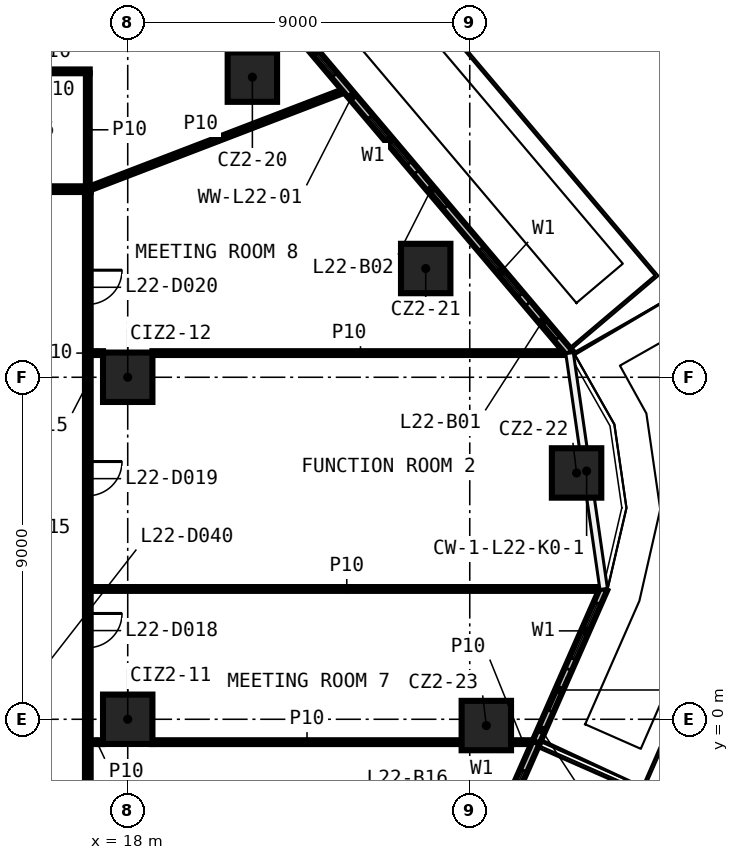
"""IFC4 building model, lengths in metres.
Left out: names, types, materials, properties, quantities, classifications, styles, units other than length and angle.
Written with IfcOpenShell. Run it as: python <this file> out.ifc"""

import sys

from ifc_helpers import new_model, si_unit, direction, frame, frame_2d, origin, origin_2d, place, context, subcontext, project, spatial, rectangle, extrude, element, fill, save


model = new_model("IFC4")
c1 = context("Model", 3, precision=1e-05, world=origin(), true_north=direction((0.0, 1.0)))
c2 = subcontext(c1, "Body", "Model", "MODEL_VIEW")
j1 = project(units=[si_unit("LENGTHUNIT", "METRE"), si_unit("PLANEANGLEUNIT", "RADIAN")], contexts=[c1])
p1 = place(None, origin())
s1 = spatial("IfcSite", under=j1, at=p1, CompositionType="ELEMENT")
p2 = place(p1, origin())
s2 = spatial("IfcBuilding", under=s1, at=p2, CompositionType="ELEMENT")
p3 = place(p2, frame((0.0, 0.0, 106.3)))
s3 = spatial("IfcBuildingStorey", under=s2, at=p3, CompositionType="ELEMENT", Elevation=106.3)
for number, where, z_axis, x_axis in (
    (1, (21.28, 16.898, 0.0), (0.0, 0.0, 1.0), (1.0, 0.0, 0.0)),
    (2, (25.841, 11.862, 0.0), (0.0, 0.0, 1.0), (1.0, 0.0, 0.0)),
    (3, (29.811, 6.482, 0.0), (0.0, 0.0, 1.0), (1.0, 0.0, 0.0)),
    (4, (27.436, -0.165, 0.0), (0.0, 0.0, 1.0), (1.0, 0.0, 0.0)),
    (5, (18.0, 0.0, 0.0), (0.0, 0.0, 1.0), (1.0, 0.0, 0.0)),
    (6, (18.0, 9.0, 0.0), (0.0, 0.0, 1.0), (1.0, 0.0, 0.0)),
):
    element("IfcColumn", number, at=place(p3, frame(where, z_axis=z_axis, x_axis=x_axis)), inside=s3, PredefinedType="COLUMN", context=c2, shape_type="SweptSolid", body=[
        extrude(rectangle(XDim=1.3, YDim=1.3, at=origin_2d()), origin(), (0.0, 0.0, 1.0), 3.3),
    ])
p4 = place(p3, frame((17.025, -0.602, 0.0), z_axis=(0.0, 0.0, 1.0), x_axis=(1.0, 0.0, 0.0)))
e7 = element("IfcWall", 7, at=p4, inside=s3, PredefinedType="PARTITIONING", context=c2, shape_type="SweptSolid", body=[
    extrude(rectangle(XDim=0.325, YDim=0.1, at=frame_2d((0.163, 0.0))), origin(), (0.0, 0.0, 1.0), 3.3),
])
p5 = place(p3, frame((18.65, -0.602, 0.0), z_axis=(0.0, 0.0, 1.0), x_axis=(1.0, 0.0, 0.0)))
e8 = element("IfcWall", 8, at=p5, inside=s3, PredefinedType="PARTITIONING", context=c2, shape_type="SweptSolid", body=[
    extrude(rectangle(XDim=8.136, YDim=0.1, at=frame_2d((4.068, 0.0))), origin(), (0.0, 0.0, 1.0), 3.3),
])
p6 = place(p3, frame((28.086, -0.602, 0.0), z_axis=(0.0, 0.0, 1.0), x_axis=(1.0, 0.0, 0.0)))
e9 = element("IfcWall", 9, at=p6, inside=s3, PredefinedType="PARTITIONING", context=c2, shape_type="SweptSolid", body=[
    extrude(rectangle(XDim=0.64, YDim=0.1, at=frame_2d((0.32, 0.0))), origin(), (0.0, 0.0, 1.0), 3.3),
])
p7 = place(p3, frame((17.025, 3.429, 0.0), z_axis=(0.0, 0.0, 1.0), x_axis=(1.0, 0.0, 0.0)))
e10 = element("IfcWall", 10, at=p7, inside=s3, PredefinedType="PARTITIONING", context=c2, shape_type="SweptSolid", body=[
    extrude(rectangle(XDim=13.477, YDim=0.1, at=frame_2d((6.739, 0.0))), origin(), (0.0, 0.0, 1.0), 3.3),
])
p8 = place(p3, frame((17.025, 9.636, 0.0), z_axis=(0.0, 0.0, 1.0), x_axis=(1.0, 0.0, 0.0)))
e11 = element("IfcWall", 11, at=p8, inside=s3, PredefinedType="PARTITIONING", context=c2, shape_type="SweptSolid", body=[
    extrude(rectangle(XDim=0.325, YDim=0.1, at=frame_2d((0.163, 0.0))), origin(), (0.0, 0.0, 1.0), 3.3),
])
p9 = place(p3, frame((18.65, 9.636, 0.0), z_axis=(0.0, 0.0, 1.0), x_axis=(1.0, 0.0, 0.0)))
e12 = element("IfcWall", 12, at=p9, inside=s3, PredefinedType="PARTITIONING", context=c2, shape_type="SweptSolid", body=[
    extrude(rectangle(XDim=10.95, YDim=0.1, at=frame_2d((5.475, 0.0))), origin(), (0.0, 0.0, 1.0), 3.3),
])
p10 = place(p3, frame((-17.025, 13.95, 0.0), z_axis=(0.0, 0.0, 1.0), x_axis=(1.0, 0.0, 0.0)))
e13 = element("IfcWall", 13, at=p10, inside=s3, PredefinedType="PARTITIONING", context=c2, shape_type="SweptSolid", body=[
    extrude(rectangle(XDim=34.05, YDim=0.15, at=frame_2d((17.025, 0.0))), origin(), (0.0, 0.0, 1.0), 3.3),
])
p11 = place(p10, frame((29.735, 0.0, 0.0)))
e14 = element("IfcOpeningElement", 14, at=p11, cuts=e13, PredefinedType="OPENING", context=c2, shape_type="SweptSolid", body=[
    extrude(rectangle(XDim=1.0, YDim=2.1, at=frame_2d((0.5, 1.05))), frame((0.0, 0.085, 0.0), z_axis=(0.0, -1.0, 0.0), x_axis=(1.0, 0.0, 0.0)), (0.0, 0.0, 1.0), 0.17),
])
p12 = place(p10, frame((25.513, 0.0, 0.0)))
e15 = element("IfcOpeningElement", 15, at=p12, cuts=e13, PredefinedType="OPENING", context=c2, shape_type="SweptSolid", body=[
    extrude(rectangle(XDim=1.0, YDim=2.1, at=frame_2d((0.5, 1.05))), frame((0.0, 0.085, 0.0), z_axis=(0.0, -1.0, 0.0), x_axis=(1.0, 0.0, 0.0)), (0.0, 0.0, 1.0), 0.17),
])
p13 = place(p10, frame((18.631, 0.0, 0.0)))
e16 = element("IfcOpeningElement", 16, at=p13, cuts=e13, PredefinedType="OPENING", context=c2, shape_type="SweptSolid", body=[
    extrude(rectangle(XDim=1.0, YDim=2.1, at=frame_2d((0.5, 1.05))), frame((0.0, 0.085, 0.0), z_axis=(0.0, -1.0, 0.0), x_axis=(1.0, 0.0, 0.0)), (0.0, 0.0, 1.0), 0.17),
])
p14 = place(p10, frame((16.545, 0.0, 0.0)))
e17 = element("IfcOpeningElement", 17, at=p14, cuts=e13, PredefinedType="OPENING", context=c2, shape_type="SweptSolid", body=[
    extrude(rectangle(XDim=1.0, YDim=2.1, at=frame_2d((0.5, 1.05))), frame((0.0, 0.085, 0.0), z_axis=(0.0, -1.0, 0.0), x_axis=(1.0, 0.0, 0.0)), (0.0, 0.0, 1.0), 0.17),
])
p15 = place(p10, frame((9.659, 0.0, 0.0)))
e18 = element("IfcOpeningElement", 18, at=p15, cuts=e13, PredefinedType="OPENING", context=c2, shape_type="SweptSolid", body=[
    extrude(rectangle(XDim=1.0, YDim=2.1, at=frame_2d((0.5, 1.05))), frame((0.0, 0.085, 0.0), z_axis=(0.0, -1.0, 0.0), x_axis=(1.0, 0.0, 0.0)), (0.0, 0.0, 1.0), 0.17),
])
p16 = place(p10, frame((7.577, 0.0, 0.0)))
e19 = element("IfcOpeningElement", 19, at=p16, cuts=e13, PredefinedType="OPENING", context=c2, shape_type="SweptSolid", body=[
    extrude(rectangle(XDim=1.0, YDim=2.1, at=frame_2d((0.5, 1.05))), frame((0.0, 0.085, 0.0), z_axis=(0.0, -1.0, 0.0), x_axis=(1.0, 0.0, 0.0)), (0.0, 0.0, 1.0), 0.17),
])
p17 = place(p10, frame((2.381, 0.0, 0.0)))
e20 = element("IfcOpeningElement", 20, at=p17, cuts=e13, PredefinedType="OPENING", context=c2, shape_type="SweptSolid", body=[
    extrude(rectangle(XDim=0.9, YDim=2.1, at=frame_2d((0.45, 1.05))), frame((0.0, 0.085, 0.0), z_axis=(0.0, -1.0, 0.0), x_axis=(1.0, 0.0, 0.0)), (0.0, 0.0, 1.0), 0.17),
])
p18 = place(p3, frame((14.5, 17.05, 0.0), z_axis=(0.0, 0.0, 1.0), x_axis=(1.0, 0.0, 0.0)))
e21 = element("IfcWall", 21, at=p18, inside=s3, PredefinedType="PARTITIONING", context=c2, shape_type="SweptSolid", body=[
    extrude(rectangle(XDim=2.5, YDim=0.1, at=frame_2d((1.25, 0.0))), origin(), (0.0, 0.0, 1.0), 3.3),
])
p19 = place(p3, frame((16.95, 13.95, 0.0), z_axis=(0.0, 0.0, 1.0), x_axis=(0.933635037811, 0.358225649796, 0.0)))
e22 = element("IfcWall", 22, at=p19, inside=s3, PredefinedType="PARTITIONING", context=c2, shape_type="SweptSolid", body=[
    extrude(rectangle(XDim=7.275, YDim=0.1, at=frame_2d((3.638, 0.0))), origin(), (0.0, 0.0, 1.0), 3.3),
])
p20 = place(p3, frame((16.95, 13.875, 0.0), z_axis=(0.0, 0.0, 1.0), x_axis=(0.0, -1.0, 0.0)))
e23 = element("IfcWall", 23, at=p20, inside=s3, PredefinedType="PARTITIONING", context=c2, shape_type="SweptSolid", body=[
    extrude(rectangle(XDim=27.75, YDim=0.15, at=frame_2d((13.875, 0.0))), origin(), (0.0, 0.0, 1.0), 3.3),
])
p21 = place(p20, frame((24.917, 0.0, 0.0)))
e24 = element("IfcOpeningElement", 24, at=p21, cuts=e23, PredefinedType="OPENING", context=c2, shape_type="SweptSolid", body=[
    extrude(rectangle(XDim=0.9, YDim=2.1, at=frame_2d((0.45, 1.05))), frame((0.0, 0.085, 0.0), z_axis=(0.0, -1.0, 0.0), x_axis=(1.0, 0.0, 0.0)), (0.0, 0.0, 1.0), 0.17),
])
p22 = place(p20, frame((20.086, 0.0, 0.0)))
e25 = element("IfcOpeningElement", 25, at=p22, cuts=e23, PredefinedType="OPENING", context=c2, shape_type="SweptSolid", body=[
    extrude(rectangle(XDim=0.9, YDim=2.1, at=frame_2d((0.45, 1.05))), frame((0.0, 0.085, 0.0), z_axis=(0.0, -1.0, 0.0), x_axis=(1.0, 0.0, 0.0)), (0.0, 0.0, 1.0), 0.17),
])
p23 = place(p20, frame((16.047, 0.0, 0.0)))
e26 = element("IfcOpeningElement", 26, at=p23, cuts=e23, PredefinedType="OPENING", context=c2, shape_type="SweptSolid", body=[
    extrude(rectangle(XDim=0.9, YDim=2.1, at=frame_2d((0.45, 1.05))), frame((0.0, 0.085, 0.0), z_axis=(0.0, -1.0, 0.0), x_axis=(1.0, 0.0, 0.0)), (0.0, 0.0, 1.0), 0.17),
])
p24 = place(p20, frame((11.091, 0.0, 0.0)))
e27 = element("IfcOpeningElement", 27, at=p24, cuts=e23, PredefinedType="OPENING", context=c2, shape_type="SweptSolid", body=[
    extrude(rectangle(XDim=0.9, YDim=2.1, at=frame_2d((0.45, 1.05))), frame((0.0, 0.085, 0.0), z_axis=(0.0, -1.0, 0.0), x_axis=(1.0, 0.0, 0.0)), (0.0, 0.0, 1.0), 0.17),
])
p25 = place(p20, frame((7.093, 0.0, 0.0)))
e28 = element("IfcOpeningElement", 28, at=p25, cuts=e23, PredefinedType="OPENING", context=c2, shape_type="SweptSolid", body=[
    extrude(rectangle(XDim=0.9, YDim=2.1, at=frame_2d((0.45, 1.05))), frame((0.0, 0.085, 0.0), z_axis=(0.0, -1.0, 0.0), x_axis=(1.0, 0.0, 0.0)), (0.0, 0.0, 1.0), 0.17),
])
p26 = place(p20, frame((2.057, 0.0, 0.0)))
e29 = element("IfcOpeningElement", 29, at=p26, cuts=e23, PredefinedType="OPENING", context=c2, shape_type="SweptSolid", body=[
    extrude(rectangle(XDim=0.9, YDim=2.1, at=frame_2d((0.45, 1.05))), frame((0.0, 0.085, 0.0), z_axis=(0.0, -1.0, 0.0), x_axis=(1.0, 0.0, 0.0)), (0.0, 0.0, 1.0), 0.17),
])
p27 = place(p3, frame((16.95, 14.025, 0.0), z_axis=(0.0, 0.0, 1.0), x_axis=(0.0, 1.0, 0.0)))
e30 = element("IfcWall", 30, at=p27, inside=s3, PredefinedType="PARTITIONING", context=c2, shape_type="SweptSolid", body=[
    extrude(rectangle(XDim=2.975, YDim=0.1, at=frame_2d((1.488, 0.0))), origin(), (0.0, 0.0, 1.0), 3.3),
])
p28 = place(p3, frame((29.626, 9.636, 0.0), z_axis=(0.0, 0.0, 1.0), x_axis=(-0.6460547702, 0.763291054514, 0.0)))
e31 = element("IfcWall", 31, at=p28, inside=s3, PredefinedType="SOLIDWALL", context=c2, shape_type="SweptSolid", body=[
    extrude(rectangle(XDim=13.615, YDim=0.2, at=frame_2d((6.808, 0.0))), origin(), (0.0, 0.0, 1.0), 3.3),
])
p29 = place(p28, frame((2.0, 0.0, 0.6)))
e32 = element("IfcOpeningElement", 32, at=p29, cuts=e31, PredefinedType="OPENING", context=c2, shape_type="SweptSolid", body=[
    extrude(rectangle(XDim=1.6, YDim=2.4, at=frame_2d((0.8, 1.2))), frame((0.0, 0.11, 0.0), z_axis=(0.0, -1.0, 0.0), x_axis=(1.0, 0.0, 0.0)), (0.0, 0.0, 1.0), 0.22),
])
p30 = place(p28, frame((0.5, 0.0, 0.0)))
e33 = element("IfcOpeningElement", 33, at=p30, cuts=e31, PredefinedType="OPENING", context=c2, shape_type="SweptSolid", body=[
    extrude(rectangle(XDim=1.2, YDim=2.4, at=frame_2d((0.6, 1.2))), frame((0.0, 0.11, 0.0), z_axis=(0.0, -1.0, 0.0), x_axis=(1.0, 0.0, 0.0)), (0.0, 0.0, 1.0), 0.22),
])
p31 = place(p28, frame((6.538, 0.0, 0.6)))
e34 = element("IfcOpeningElement", 34, at=p31, cuts=e31, PredefinedType="OPENING", context=c2, shape_type="SweptSolid", body=[
    extrude(rectangle(XDim=1.6, YDim=2.4, at=frame_2d((0.8, 1.2))), frame((0.0, 0.11, 0.0), z_axis=(0.0, -1.0, 0.0), x_axis=(1.0, 0.0, 0.0)), (0.0, 0.0, 1.0), 0.22),
])
p32 = place(p28, frame((5.038, 0.0, 0.0)))
e35 = element("IfcOpeningElement", 35, at=p32, cuts=e31, PredefinedType="OPENING", context=c2, shape_type="SweptSolid", body=[
    extrude(rectangle(XDim=1.2, YDim=2.4, at=frame_2d((0.6, 1.2))), frame((0.0, 0.11, 0.0), z_axis=(0.0, -1.0, 0.0), x_axis=(1.0, 0.0, 0.0)), (0.0, 0.0, 1.0), 0.22),
])
p33 = place(p28, frame((9.577, 0.0, 0.6)))
e36 = element("IfcOpeningElement", 36, at=p33, cuts=e31, PredefinedType="OPENING", context=c2, shape_type="SweptSolid", body=[
    extrude(rectangle(XDim=1.6, YDim=2.4, at=frame_2d((0.8, 1.2))), frame((0.0, 0.11, 0.0), z_axis=(0.0, -1.0, 0.0), x_axis=(1.0, 0.0, 0.0)), (0.0, 0.0, 1.0), 0.22),
])
p34 = place(p28, frame((11.577, 0.0, 0.0)))
e37 = element("IfcOpeningElement", 37, at=p34, cuts=e31, PredefinedType="OPENING", context=c2, shape_type="SweptSolid", body=[
    extrude(rectangle(XDim=1.2, YDim=2.4, at=frame_2d((0.6, 1.2))), frame((0.0, 0.11, 0.0), z_axis=(0.0, -1.0, 0.0), x_axis=(1.0, 0.0, 0.0)), (0.0, 0.0, 1.0), 0.22),
])
p35 = place(p3, frame((21.626, -16.76, 0.0), z_axis=(0.0, 0.0, 1.0), x_axis=(0.403293642116, 0.915070619258, 0.0)))
e38 = element("IfcWall", 38, at=p35, inside=s3, PredefinedType="SOLIDWALL", context=c2, shape_type="SweptSolid", body=[
    extrude(rectangle(XDim=17.657, YDim=0.2, at=frame_2d((8.829, 0.0))), origin(), (0.0, 0.0, 1.0), 3.3),
])
p36 = place(p35, frame((2.0, 0.0, 0.6)))
e39 = element("IfcOpeningElement", 39, at=p36, cuts=e38, PredefinedType="OPENING", context=c2, shape_type="SweptSolid", body=[
    extrude(rectangle(XDim=1.6, YDim=2.4, at=frame_2d((0.8, 1.2))), frame((0.0, 0.11, 0.0), z_axis=(0.0, -1.0, 0.0), x_axis=(1.0, 0.0, 0.0)), (0.0, 0.0, 1.0), 0.22),
])
p37 = place(p35, frame((0.5, 0.0, 0.0)))
e40 = element("IfcOpeningElement", 40, at=p37, cuts=e38, PredefinedType="OPENING", context=c2, shape_type="SweptSolid", body=[
    extrude(rectangle(XDim=1.2, YDim=2.4, at=frame_2d((0.6, 1.2))), frame((0.0, 0.11, 0.0), z_axis=(0.0, -1.0, 0.0), x_axis=(1.0, 0.0, 0.0)), (0.0, 0.0, 1.0), 0.22),
])
p38 = place(p35, frame((6.414, 0.0, 0.6)))
e41 = element("IfcOpeningElement", 41, at=p38, cuts=e38, PredefinedType="OPENING", context=c2, shape_type="SweptSolid", body=[
    extrude(rectangle(XDim=1.6, YDim=2.4, at=frame_2d((0.8, 1.2))), frame((0.0, 0.11, 0.0), z_axis=(0.0, -1.0, 0.0), x_axis=(1.0, 0.0, 0.0)), (0.0, 0.0, 1.0), 0.22),
])
p39 = place(p35, frame((4.914, 0.0, 0.0)))
e42 = element("IfcOpeningElement", 42, at=p39, cuts=e38, PredefinedType="OPENING", context=c2, shape_type="SweptSolid", body=[
    extrude(rectangle(XDim=1.2, YDim=2.4, at=frame_2d((0.6, 1.2))), frame((0.0, 0.11, 0.0), z_axis=(0.0, -1.0, 0.0), x_axis=(1.0, 0.0, 0.0)), (0.0, 0.0, 1.0), 0.22),
])
p40 = place(p35, frame((9.329, 0.0, 0.6)))
e43 = element("IfcOpeningElement", 43, at=p40, cuts=e38, PredefinedType="OPENING", context=c2, shape_type="SweptSolid", body=[
    extrude(rectangle(XDim=1.6, YDim=2.4, at=frame_2d((0.8, 1.2))), frame((0.0, 0.11, 0.0), z_axis=(0.0, -1.0, 0.0), x_axis=(1.0, 0.0, 0.0)), (0.0, 0.0, 1.0), 0.22),
])
p41 = place(p35, frame((11.329, 0.0, 0.0)))
e44 = element("IfcOpeningElement", 44, at=p41, cuts=e38, PredefinedType="OPENING", context=c2, shape_type="SweptSolid", body=[
    extrude(rectangle(XDim=1.2, YDim=2.4, at=frame_2d((0.6, 1.2))), frame((0.0, 0.11, 0.0), z_axis=(0.0, -1.0, 0.0), x_axis=(1.0, 0.0, 0.0)), (0.0, 0.0, 1.0), 0.22),
])
p42 = place(p35, frame((15.243, 0.0, 0.6)))
e45 = element("IfcOpeningElement", 45, at=p42, cuts=e38, PredefinedType="OPENING", context=c2, shape_type="SweptSolid", body=[
    extrude(rectangle(XDim=1.6, YDim=2.4, at=frame_2d((0.8, 1.2))), frame((0.0, 0.11, 0.0), z_axis=(0.0, -1.0, 0.0), x_axis=(1.0, 0.0, 0.0)), (0.0, 0.0, 1.0), 0.22),
])
p43 = place(p35, frame((13.743, 0.0, 0.0)))
e46 = element("IfcOpeningElement", 46, at=p43, cuts=e38, PredefinedType="OPENING", context=c2, shape_type="SweptSolid", body=[
    extrude(rectangle(XDim=1.2, YDim=2.4, at=frame_2d((0.6, 1.2))), frame((0.0, 0.11, 0.0), z_axis=(0.0, -1.0, 0.0), x_axis=(1.0, 0.0, 0.0)), (0.0, 0.0, 1.0), 0.22),
])
p44 = place(p3, frame((28.748, -0.602, 0.0), z_axis=(0.0, 0.0, 1.0), x_axis=(0.403256746057, 0.91508687935, 0.0)))
e47 = element("IfcWall", 47, at=p44, inside=s3, PredefinedType="SOLIDWALL", context=c2, shape_type="SweptSolid", body=[
    extrude(rectangle(XDim=4.405, YDim=0.2, at=frame_2d((2.203, 0.0))), origin(), (0.0, 0.0, 1.0), 3.3),
])
p45 = place(p44, frame((2.4, 0.0, 0.6)))
e48 = element("IfcOpeningElement", 48, at=p45, cuts=e47, PredefinedType="OPENING", context=c2, shape_type="SweptSolid", body=[
    extrude(rectangle(XDim=1.6, YDim=2.4, at=frame_2d((0.8, 1.2))), frame((0.0, 0.11, 0.0), z_axis=(0.0, -1.0, 0.0), x_axis=(1.0, 0.0, 0.0)), (0.0, 0.0, 1.0), 0.22),
])
p46 = place(p44, frame((0.9, 0.0, 0.0)))
e49 = element("IfcOpeningElement", 49, at=p46, cuts=e47, PredefinedType="OPENING", context=c2, shape_type="SweptSolid", body=[
    extrude(rectangle(XDim=1.2, YDim=2.4, at=frame_2d((0.6, 1.2))), frame((0.0, 0.11, 0.0), z_axis=(0.0, -1.0, 0.0), x_axis=(1.0, 0.0, 0.0)), (0.0, 0.0, 1.0), 0.22),
])
p47 = place(p24, origin())
e50 = element("IfcDoor", 50, at=p47, inside=s3, OperationType="SINGLE_SWING_LEFT", PredefinedType="DOOR", context=c2, shape_type="SweptSolid", body=[
    extrude(rectangle(XDim=0.9, YDim=2.1, at=frame_2d((0.45, 1.05))), frame((0.0, 0.025, 0.0), z_axis=(0.0, -1.0, 0.0), x_axis=(1.0, 0.0, 0.0)), (0.0, 0.0, 1.0), 0.05),
])
fill(e27, e50)
p48 = place(p25, origin())
e51 = element("IfcDoor", 51, at=p48, inside=s3, OperationType="SINGLE_SWING_RIGHT", PredefinedType="DOOR", context=c2, shape_type="SweptSolid", body=[
    extrude(rectangle(XDim=0.9, YDim=2.1, at=frame_2d((0.45, 1.05))), frame((0.0, 0.025, 0.0), z_axis=(0.0, -1.0, 0.0), x_axis=(1.0, 0.0, 0.0)), (0.0, 0.0, 1.0), 0.05),
])
fill(e28, e51)
p49 = place(p26, origin())
e52 = element("IfcDoor", 52, at=p49, inside=s3, OperationType="SINGLE_SWING_LEFT", PredefinedType="DOOR", context=c2, shape_type="SweptSolid", body=[
    extrude(rectangle(XDim=0.9, YDim=2.1, at=frame_2d((0.45, 1.05))), frame((0.0, 0.025, 0.0), z_axis=(0.0, -1.0, 0.0), x_axis=(1.0, 0.0, 0.0)), (0.0, 0.0, 1.0), 0.05),
])
fill(e29, e52)
p50 = place(p29, origin())
e53 = element("IfcWindow", 53, at=p50, inside=s3, PartitioningType="SINGLE_PANEL", PredefinedType="WINDOW", context=c2, shape_type="SweptSolid", body=[
    extrude(rectangle(XDim=1.6, YDim=2.4, at=frame_2d((0.8, 1.2))), frame((0.0, 0.03, 0.0), z_axis=(0.0, -1.0, 0.0), x_axis=(1.0, 0.0, 0.0)), (0.0, 0.0, 1.0), 0.06),
])
fill(e32, e53)
p51 = place(p30, origin())
e54 = element("IfcDoor", 54, at=p51, inside=s3, OperationType="SLIDING_TO_LEFT", PredefinedType="DOOR", context=c2, shape_type="SweptSolid", body=[
    extrude(rectangle(XDim=1.2, YDim=2.4, at=frame_2d((0.6, 1.2))), frame((0.0, 0.025, 0.0), z_axis=(0.0, -1.0, 0.0), x_axis=(1.0, 0.0, 0.0)), (0.0, 0.0, 1.0), 0.05),
])
fill(e33, e54)
p52 = place(p31, origin())
e55 = element("IfcWindow", 55, at=p52, inside=s3, PartitioningType="SINGLE_PANEL", PredefinedType="WINDOW", context=c2, shape_type="SweptSolid", body=[
    extrude(rectangle(XDim=1.6, YDim=2.4, at=frame_2d((0.8, 1.2))), frame((0.0, 0.03, 0.0), z_axis=(0.0, -1.0, 0.0), x_axis=(1.0, 0.0, 0.0)), (0.0, 0.0, 1.0), 0.06),
])
fill(e34, e55)
p53 = place(p32, origin())
e56 = element("IfcDoor", 56, at=p53, inside=s3, OperationType="SLIDING_TO_LEFT", PredefinedType="DOOR", context=c2, shape_type="SweptSolid", body=[
    extrude(rectangle(XDim=1.2, YDim=2.4, at=frame_2d((0.6, 1.2))), frame((0.0, 0.025, 0.0), z_axis=(0.0, -1.0, 0.0), x_axis=(1.0, 0.0, 0.0)), (0.0, 0.0, 1.0), 0.05),
])
fill(e35, e56)
p54 = place(p33, origin())
e57 = element("IfcWindow", 57, at=p54, inside=s3, PartitioningType="SINGLE_PANEL", PredefinedType="WINDOW", context=c2, shape_type="SweptSolid", body=[
    extrude(rectangle(XDim=1.6, YDim=2.4, at=frame_2d((0.8, 1.2))), frame((0.0, 0.03, 0.0), z_axis=(0.0, -1.0, 0.0), x_axis=(1.0, 0.0, 0.0)), (0.0, 0.0, 1.0), 0.06),
])
fill(e36, e57)
p55 = place(p42, origin())
e58 = element("IfcWindow", 58, at=p55, inside=s3, PartitioningType="SINGLE_PANEL", PredefinedType="WINDOW", context=c2, shape_type="SweptSolid", body=[
    extrude(rectangle(XDim=1.6, YDim=2.4, at=frame_2d((0.8, 1.2))), frame((0.0, 0.03, 0.0), z_axis=(0.0, -1.0, 0.0), x_axis=(1.0, 0.0, 0.0)), (0.0, 0.0, 1.0), 0.06),
])
fill(e45, e58)
p56 = place(p45, origin())
e59 = element("IfcWindow", 59, at=p56, inside=s3, PartitioningType="SINGLE_PANEL", PredefinedType="WINDOW", context=c2, shape_type="SweptSolid", body=[
    extrude(rectangle(XDim=1.6, YDim=2.4, at=frame_2d((0.8, 1.2))), frame((0.0, 0.03, 0.0), z_axis=(0.0, -1.0, 0.0), x_axis=(1.0, 0.0, 0.0)), (0.0, 0.0, 1.0), 0.06),
])
fill(e48, e59)
p57 = place(p46, origin())
e60 = element("IfcDoor", 60, at=p57, inside=s3, OperationType="SLIDING_TO_LEFT", PredefinedType="DOOR", context=c2, shape_type="SweptSolid", body=[
    extrude(rectangle(XDim=1.2, YDim=2.4, at=frame_2d((0.6, 1.2))), frame((0.0, 0.025, 0.0), z_axis=(0.0, -1.0, 0.0), x_axis=(1.0, 0.0, 0.0)), (0.0, 0.0, 1.0), 0.05),
])
fill(e49, e60)
save(model, sys.argv[1])
